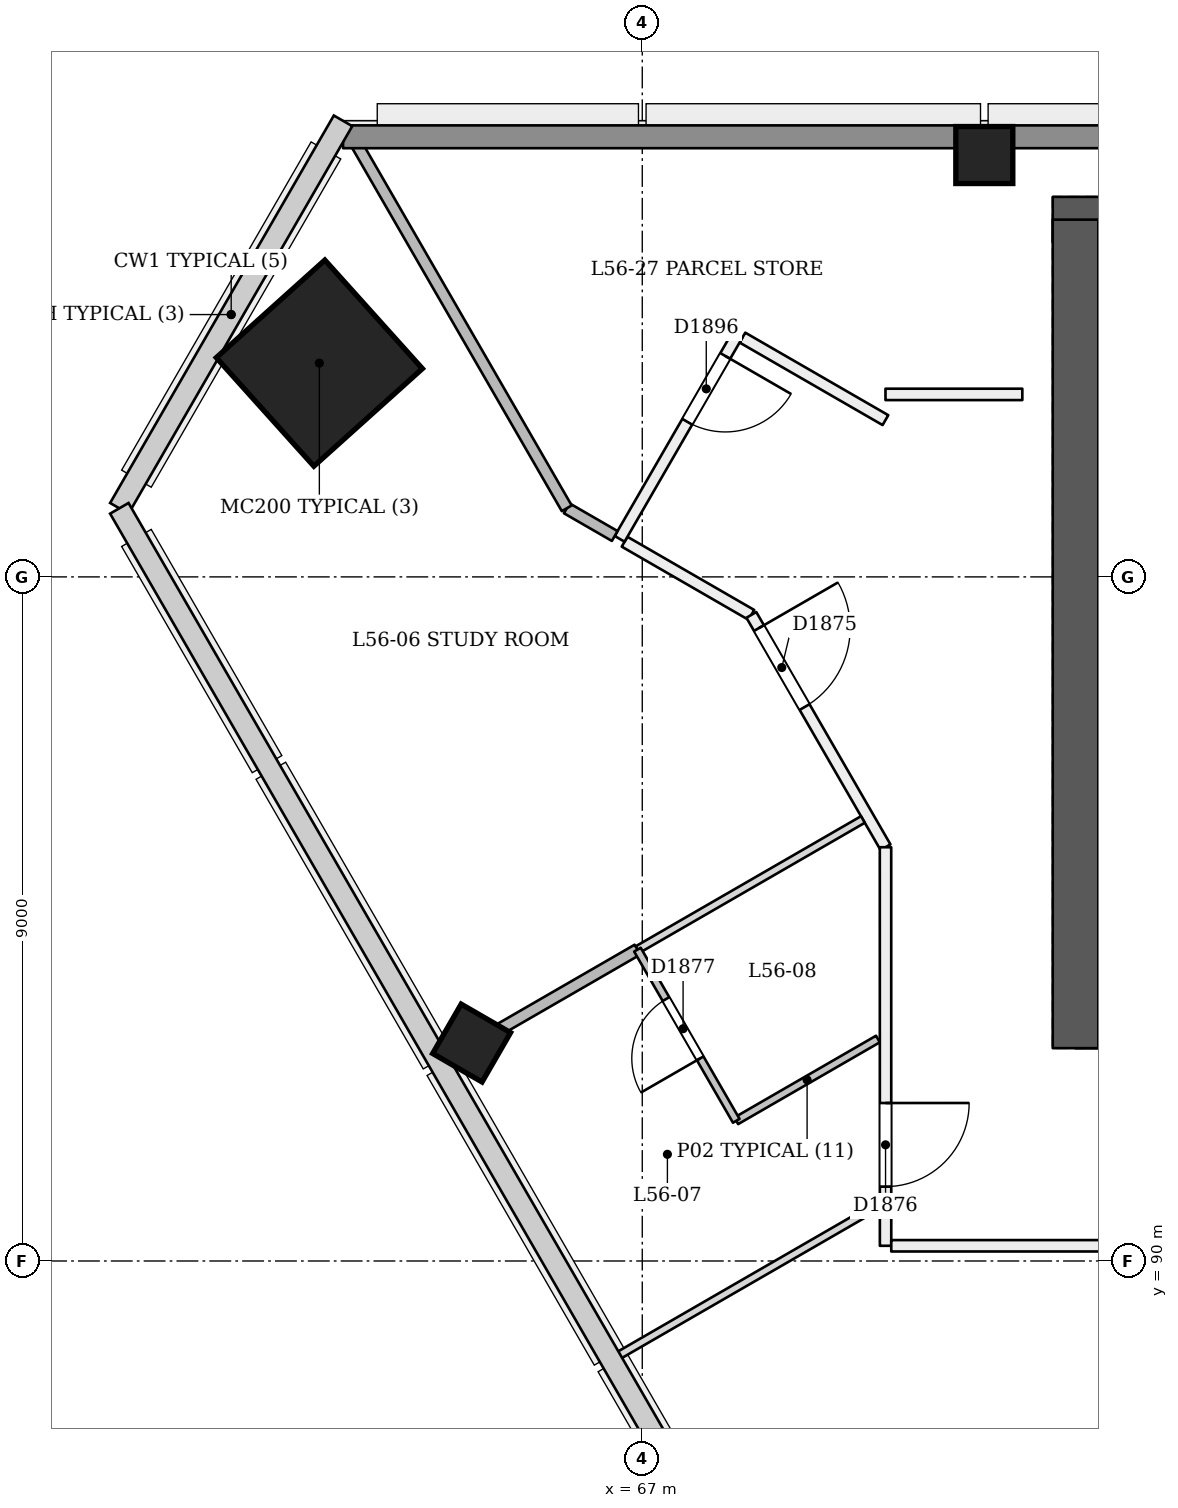
"""IFC4 building model, lengths in metres.
Left out: names, types, materials, properties, quantities, classifications, styles, units other than length and angle.
Written with IfcOpenShell. Run it as: python <this file> out.ifc"""

import sys

from ifc_helpers import new_model, si_unit, direction, frame, frame_2d, origin, origin_2d, place, context, subcontext, project, spatial, rectangle, extrude, element, fill, save


model = new_model("IFC4")
c1 = context("Model", 3, precision=1e-05, world=origin(), true_north=direction((0.0, 1.0)))
c2 = subcontext(c1, "Body", "Model", "MODEL_VIEW")
j1 = project(units=[si_unit("LENGTHUNIT", "METRE"), si_unit("PLANEANGLEUNIT", "RADIAN")], contexts=[c1])
p1 = place(None, origin())
s1 = spatial("IfcSite", under=j1, at=p1, CompositionType="ELEMENT")
p2 = place(p1, origin())
s2 = spatial("IfcBuilding", under=s1, at=p2, CompositionType="ELEMENT")
p3 = place(p2, frame((0.0, 0.0, 219.4)))
s3 = spatial("IfcBuildingStorey", under=s2, at=p3, CompositionType="ELEMENT", Elevation=219.4)
p4 = place(p3, frame((72.7, 93.1, 0.0), z_axis=(0.0, 0.0, 1.0), x_axis=(1.0, 0.0, 0.0)))
e1 = element("IfcWall", 1, at=p4, inside=s3, PredefinedType="SHEAR", context=c2, shape_type="SweptSolid", body=[
    extrude(rectangle(XDim=24.9, YDim=0.6, at=frame_2d((12.45, 0.0))), origin(), (0.0, 0.0, 1.0), 3.6),
])
p5 = place(p4, frame((1.1, 0.0, 0.0)))
e2 = element("IfcOpeningElement", 2, at=p5, cuts=e1, PredefinedType="OPENING", context=c2, shape_type="SweptSolid", body=[
    extrude(rectangle(XDim=1.2, YDim=2.1, at=frame_2d((0.6, 1.05))), frame((0.0, 0.311, 0.0), z_axis=(0.0, -1.0, 0.0), x_axis=(1.0, 0.0, 0.0)), (0.0, 0.0, 1.0), 0.621),
])
p6 = place(p4, frame((3.3, 0.0, 0.0)))
e3 = element("IfcOpeningElement", 3, at=p6, cuts=e1, PredefinedType="OPENING", context=c2, shape_type="SweptSolid", body=[
    extrude(rectangle(XDim=1.2, YDim=2.1, at=frame_2d((0.6, 1.05))), frame((0.0, 0.311, 0.0), z_axis=(0.0, -1.0, 0.0), x_axis=(1.0, 0.0, 0.0)), (0.0, 0.0, 1.0), 0.621),
])
p7 = place(p4, frame((13.3, 0.0, 0.0)))
e4 = element("IfcOpeningElement", 4, at=p7, cuts=e1, PredefinedType="OPENING", context=c2, shape_type="SweptSolid", body=[
    extrude(rectangle(XDim=1.2, YDim=2.1, at=frame_2d((0.6, 1.05))), frame((0.0, 0.311, 0.0), z_axis=(0.0, -1.0, 0.0), x_axis=(1.0, 0.0, 0.0)), (0.0, 0.0, 1.0), 0.621),
])
p8 = place(p4, frame((16.163, 0.0, 0.0)))
e5 = element("IfcOpeningElement", 5, at=p8, cuts=e1, PredefinedType="OPENING", context=c2, shape_type="SweptSolid", body=[
    extrude(rectangle(XDim=1.0, YDim=2.1, at=frame_2d((0.5, 1.05))), frame((0.0, 0.311, 0.0), z_axis=(0.0, -1.0, 0.0), x_axis=(1.0, 0.0, 0.0)), (0.0, 0.0, 1.0), 0.621),
])
p9 = place(p4, frame((19.6, 0.0, 0.0)))
e6 = element("IfcOpeningElement", 6, at=p9, cuts=e1, PredefinedType="OPENING", context=c2, shape_type="SweptSolid", body=[
    extrude(rectangle(XDim=1.0, YDim=2.1, at=frame_2d((0.5, 1.05))), frame((0.0, 0.311, 0.0), z_axis=(0.0, -1.0, 0.0), x_axis=(1.0, 0.0, 0.0)), (0.0, 0.0, 1.0), 0.621),
])
p10 = place(p4, frame((22.587, 0.0, 0.0)))
e7 = element("IfcOpeningElement", 7, at=p10, cuts=e1, PredefinedType="OPENING", context=c2, shape_type="SweptSolid", body=[
    extrude(rectangle(XDim=1.0, YDim=2.1, at=frame_2d((0.5, 1.05))), frame((0.0, 0.311, 0.0), z_axis=(0.0, -1.0, 0.0), x_axis=(1.0, 0.0, 0.0)), (0.0, 0.0, 1.0), 0.621),
])
p11 = place(p3, frame((97.3, 103.7, 0.0), z_axis=(0.0, 0.0, 1.0), x_axis=(-1.0, 0.0, 0.0)))
e8 = element("IfcWall", 8, at=p11, inside=s3, PredefinedType="SHEAR", context=c2, shape_type="SweptSolid", body=[
    extrude(rectangle(XDim=24.9, YDim=0.6, at=frame_2d((12.45, 0.0))), origin(), (0.0, 0.0, 1.0), 3.6),
])
p12 = place(p3, frame((72.7, 103.7, 0.0), z_axis=(0.0, 0.0, 1.0), x_axis=(0.0, -1.0, 0.0)))
e9 = element("IfcWall", 9, at=p12, inside=s3, PredefinedType="SHEAR", context=c2, shape_type="SweptSolid", body=[
    extrude(rectangle(XDim=10.9, YDim=0.6, at=frame_2d((5.45, 0.0))), origin(), (0.0, 0.0, 1.0), 3.6),
])
p13 = place(p3, frame((62.718, 101.801, 0.0), z_axis=(0.028401796786, 0.009286506348, 0.999553449666), x_axis=(-0.866201950793, 0.49929472605, 0.019973907494)))
e10 = element("IfcColumn", 10, at=p13, inside=s3, PredefinedType="COLUMN", context=c2, shape_type="SweptSolid", body=[
    extrude(rectangle(XDim=1.92, YDim=1.92, at=origin_2d()), origin(), (0.0, 0.0, 1.0), 3.602),
])
p14 = place(p3, frame((71.5, 104.55, 0.0), z_axis=(0.0, 0.0, 1.0), x_axis=(1.0, 0.0, 0.0)))
e11 = element("IfcColumn", 11, at=p14, inside=s3, PredefinedType="COLUMN", context=c2, shape_type="SweptSolid", body=[
    extrude(rectangle(XDim=0.75, YDim=0.75, at=origin_2d()), origin(), (0.0, 0.0, 1.0), 3.6),
])
p15 = place(p3, frame((64.728, 92.82, -0.024), z_axis=(0.022212328788, 0.038465252292, 0.999013031354), x_axis=(-0.865642454901, -0.499182755274, 0.038467091256)))
e12 = element("IfcColumn", 12, at=p15, inside=s3, PredefinedType="COLUMN", context=c2, shape_type="SweptSolid", body=[
    extrude(rectangle(XDim=0.75, YDim=0.75, at=origin_2d()), origin(), (0.0, 0.0, 1.0), 3.605),
])
p16 = place(p3, frame((66.767, 99.463, 0.0), z_axis=(0.0, 0.0, 1.0), x_axis=(0.86605048973, -0.49995654735, 0.0)))
e13 = element("IfcWall", 13, at=p16, inside=s3, PredefinedType="PARTITIONING", context=c2, shape_type="SweptSolid", body=[
    extrude(rectangle(XDim=1.926, YDim=0.15, at=frame_2d((0.963, 0.0))), origin(), (0.0, 0.0, 1.0), 3.2),
])
p17 = place(p3, frame((68.435, 98.5, 0.0), z_axis=(0.0, 0.0, 1.0), x_axis=(0.499977931934, -0.866038144413, 0.0)))
e14 = element("IfcWall", 14, at=p17, inside=s3, PredefinedType="PARTITIONING", context=c2, shape_type="SweptSolid", body=[
    extrude(rectangle(XDim=3.53, YDim=0.15, at=frame_2d((1.765, 0.0))), origin(), (0.0, 0.0, 1.0), 3.2),
])
p18 = place(p17, frame((0.2, 0.0, 0.0)))
e15 = element("IfcOpeningElement", 15, at=p18, cuts=e14, PredefinedType="OPENING", context=c2, shape_type="SweptSolid", body=[
    extrude(rectangle(XDim=1.2, YDim=2.1, at=frame_2d((0.6, 1.05))), frame((0.0, 0.085, 0.0), z_axis=(0.0, -1.0, 0.0), x_axis=(1.0, 0.0, 0.0)), (0.0, 0.0, 1.0), 0.171),
])
p19 = place(p3, frame((70.2, 95.443, 0.0), z_axis=(0.0, 0.0, 1.0), x_axis=(0.000139684312, -0.999999990244, 0.0)))
e16 = element("IfcWall", 16, at=p19, inside=s3, PredefinedType="PARTITIONING", context=c2, shape_type="SweptSolid", body=[
    extrude(rectangle(XDim=5.243, YDim=0.15, at=frame_2d((2.622, 0.0))), origin(), (0.0, 0.0, 1.0), 3.2),
])
p20 = place(p19, frame((3.365, 0.0, 0.0)))
e17 = element("IfcOpeningElement", 17, at=p20, cuts=e16, PredefinedType="OPENING", context=c2, shape_type="SweptSolid", body=[
    extrude(rectangle(XDim=1.1, YDim=2.1, at=frame_2d((0.55, 1.05))), frame((0.0, 0.085, 0.0), z_axis=(0.0, -1.0, 0.0), x_axis=(1.0, 0.0, 0.0)), (0.0, 0.0, 1.0), 0.171),
])
p21 = place(p3, frame((70.276, 90.2, 0.0), z_axis=(0.0, 0.0, 1.0), x_axis=(1.0, 0.0, 0.0)))
e18 = element("IfcWall", 18, at=p21, inside=s3, PredefinedType="PARTITIONING", context=c2, shape_type="SweptSolid", body=[
    extrude(rectangle(XDim=2.951, YDim=0.15, at=frame_2d((1.476, 0.0))), origin(), (0.0, 0.0, 1.0), 3.2),
])
p22 = place(p3, frame((72.0, 101.401, 0.0), z_axis=(0.0, 0.0, 1.0), x_axis=(-1.0, 0.0, 0.0)))
e19 = element("IfcWall", 19, at=p22, inside=s3, PredefinedType="PARTITIONING", context=c2, shape_type="SweptSolid", body=[
    extrude(rectangle(XDim=1.8, YDim=0.15, at=frame_2d((0.9, 0.0))), origin(), (0.0, 0.0, 1.0), 3.2),
])
p23 = place(p3, frame((70.199, 101.062, 0.0), z_axis=(0.0, 0.0, 1.0), x_axis=(-0.866097618038, 0.499874900378, 0.0)))
e20 = element("IfcWall", 20, at=p23, inside=s3, PredefinedType="PARTITIONING", context=c2, shape_type="SweptSolid", body=[
    extrude(rectangle(XDim=2.172, YDim=0.15, at=frame_2d((1.086, 0.0))), origin(), (0.0, 0.0, 1.0), 3.2),
])
p24 = place(p3, frame((68.253, 102.186, 0.0), z_axis=(0.0, 0.0, 1.0), x_axis=(-0.50007687212, -0.865981017096, 0.0)))
e21 = element("IfcWall", 21, at=p24, inside=s3, PredefinedType="PARTITIONING", context=c2, shape_type="SweptSolid", body=[
    extrude(rectangle(XDim=3.101, YDim=0.15, at=frame_2d((1.55, 0.0))), origin(), (0.0, 0.0, 1.0), 3.2),
])
p25 = place(p24, frame((0.322, 0.0, 0.0)))
e22 = element("IfcOpeningElement", 22, at=p25, cuts=e21, PredefinedType="OPENING", context=c2, shape_type="SweptSolid", body=[
    extrude(rectangle(XDim=1.0, YDim=2.1, at=frame_2d((0.5, 1.05))), frame((0.0, 0.085, 0.0), z_axis=(0.0, -1.0, 0.0), x_axis=(1.0, 0.0, 0.0)), (0.0, 0.0, 1.0), 0.171),
])
p26 = place(p3, frame((64.425, 92.646, 0.0), z_axis=(0.0, 0.0, 1.0), x_axis=(0.865996321171, 0.50005036918, 0.0)))
e23 = element("IfcWall", 23, at=p26, inside=s3, PredefinedType="PARTITIONING", context=c2, shape_type="SweptSolid", body=[
    extrude(rectangle(XDim=2.9, YDim=0.15, at=frame_2d((1.45, 0.0))), origin(), (0.0, 0.0, 1.0), 2.7),
])
p27 = place(p3, frame((66.937, 94.096, 0.0), z_axis=(0.0, 0.0, 1.0), x_axis=(0.866032454348, 0.499987787867, 0.0)))
e24 = element("IfcWall", 24, at=p27, inside=s3, PredefinedType="PARTITIONING", context=c2, shape_type="SweptSolid", body=[
    extrude(rectangle(XDim=3.425, YDim=0.1, at=frame_2d((1.712, 0.0))), origin(), (0.0, 0.0, 1.0), 3.2),
])
p28 = place(p3, frame((66.637, 99.538, 0.0), z_axis=(0.0, 0.0, 1.0), x_axis=(-0.866006986733, 0.500031897912, 0.0)))
e25 = element("IfcWall", 25, at=p28, inside=s3, PredefinedType="PARTITIONING", context=c2, shape_type="SweptSolid", body=[
    extrude(rectangle(XDim=0.729, YDim=0.15, at=frame_2d((0.364, 0.0))), origin(), (0.0, 0.0, 1.0), 3.2),
])
p29 = place(p3, frame((66.007, 99.902, 0.0), z_axis=(0.0, 0.0, 1.0), x_axis=(-0.500020306647, 0.866013679419, 0.0)))
e26 = element("IfcWall", 26, at=p29, inside=s3, PredefinedType="PARTITIONING", context=c2, shape_type="SweptSolid", body=[
    extrude(rectangle(XDim=5.771, YDim=0.15, at=frame_2d((2.885, 0.0))), origin(), (0.0, 0.0, 1.0), 2.7),
])
p30 = place(p3, frame((70.1, 92.92, 0.0), z_axis=(0.0, 0.0, 1.0), x_axis=(-0.866000447062, -0.500043223821, 0.0)))
e27 = element("IfcWall", 27, at=p30, inside=s3, PredefinedType="PARTITIONING", context=c2, shape_type="SweptSolid", body=[
    extrude(rectangle(XDim=2.152, YDim=0.1, at=frame_2d((1.076, 0.0))), origin(), (0.0, 0.0, 1.0), 3.2),
])
p31 = place(p3, frame((68.237, 91.844, 0.0), z_axis=(0.0, 0.0, 1.0), x_axis=(-0.500006934395, 0.866021400173, 0.0)))
e28 = element("IfcWall", 28, at=p31, inside=s3, PredefinedType="PARTITIONING", context=c2, shape_type="SweptSolid", body=[
    extrude(rectangle(XDim=2.6, YDim=0.1, at=frame_2d((1.3, 0.0))), origin(), (0.0, 0.0, 1.0), 3.2),
])
p32 = place(p31, frame((0.949, 0.0, 0.0)))
e29 = element("IfcOpeningElement", 29, at=p32, cuts=e28, PredefinedType="OPENING", context=c2, shape_type="SweptSolid", body=[
    extrude(rectangle(XDim=0.9, YDim=2.1, at=frame_2d((0.45, 1.05))), frame((0.0, 0.061, 0.0), z_axis=(0.0, -1.0, 0.0), x_axis=(1.0, 0.0, 0.0)), (0.0, 0.0, 1.0), 0.121),
])
p33 = place(p3, frame((66.657, 88.739, 0.0), z_axis=(0.0, 0.0, 1.0), x_axis=(0.866024026425, 0.500002385648, 0.0)))
e30 = element("IfcWall", 30, at=p33, inside=s3, PredefinedType="PARTITIONING", context=c2, shape_type="SweptSolid", body=[
    extrude(rectangle(XDim=3.976, YDim=0.1, at=frame_2d((1.988, 0.0))), origin(), (0.0, 0.0, 1.0), 2.7),
])
p34 = place(p3, frame((63.063, 104.79, 0.0), z_axis=(0.0, 0.0, 1.0), x_axis=(1.0, 0.0, 0.0)))
e31 = element("IfcWall", 31, at=p34, inside=s3, PredefinedType="SOLIDWALL", context=c2, shape_type="SweptSolid", body=[
    extrude(rectangle(XDim=43.874, YDim=0.3, at=frame_2d((21.937, 0.0))), origin(), (0.0, 0.0, 1.0), 2.7),
])
p35 = place(p18, origin())
e32 = element("IfcDoor", 32, at=p35, inside=s3, OperationType="SINGLE_SWING_LEFT", PredefinedType="NOTDEFINED", context=c2, shape_type="SweptSolid", body=[
    extrude(rectangle(XDim=1.2, YDim=2.1, at=frame_2d((0.6, 1.05))), frame((0.0, 0.025, 0.0), z_axis=(0.0, -1.0, 0.0), x_axis=(1.0, 0.0, 0.0)), (0.0, 0.0, 1.0), 0.05),
])
fill(e15, e32)
p36 = place(p20, origin())
e33 = element("IfcDoor", 33, at=p36, inside=s3, OperationType="SINGLE_SWING_LEFT", PredefinedType="NOTDEFINED", context=c2, shape_type="SweptSolid", body=[
    extrude(rectangle(XDim=1.1, YDim=2.1, at=frame_2d((0.55, 1.05))), frame((0.0, 0.025, 0.0), z_axis=(0.0, -1.0, 0.0), x_axis=(1.0, 0.0, 0.0)), (0.0, 0.0, 1.0), 0.05),
])
fill(e17, e33)
p37 = place(p32, origin())
e34 = element("IfcDoor", 34, at=p37, inside=s3, OperationType="SINGLE_SWING_LEFT", PredefinedType="NOTDEFINED", context=c2, shape_type="SweptSolid", body=[
    extrude(rectangle(XDim=0.9, YDim=2.1, at=frame_2d((0.45, 1.05))), frame((0.0, 0.025, 0.0), z_axis=(0.0, -1.0, 0.0), x_axis=(1.0, 0.0, 0.0)), (0.0, 0.0, 1.0), 0.05),
])
fill(e29, e34)
p38 = place(p25, origin())
e35 = element("IfcDoor", 35, at=p38, inside=s3, OperationType="SINGLE_SWING_LEFT", PredefinedType="NOTDEFINED", context=c2, shape_type="SweptSolid", body=[
    extrude(rectangle(XDim=1.0, YDim=2.1, at=frame_2d((0.5, 1.05))), frame((0.0, 0.025, 0.0), z_axis=(0.0, -1.0, 0.0), x_axis=(1.0, 0.0, 0.0)), (0.0, 0.0, 1.0), 0.05),
])
fill(e22, e35)
save(model, sys.argv[1])
